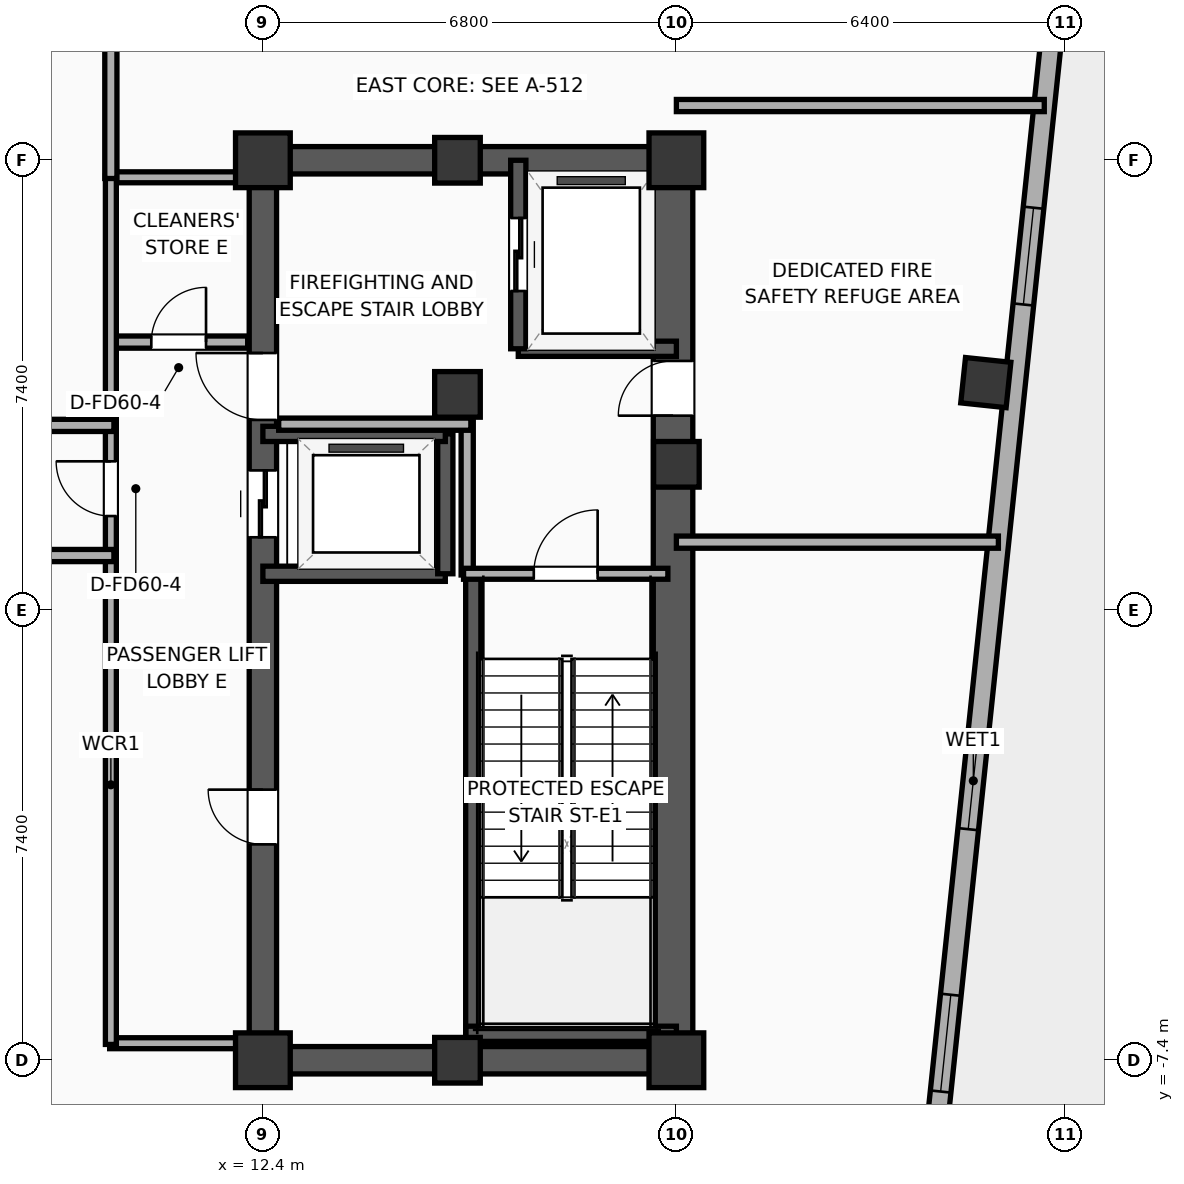
"""IFC4 building model, lengths in metres.
Left out: names, types, materials, properties, quantities, classifications, styles, units other than length and angle.
Written with IfcOpenShell. Run it as: python <this file> out.ifc"""

import sys

from ifc_helpers import new_model, si_unit, direction, frame, frame_2d, origin, origin_2d, place, context, subcontext, project, spatial, rectangle, hollow_rectangle, extrude, element, fill, save


model = new_model("IFC4")
c1 = context("Model", 3, precision=1e-05, world=origin(), true_north=direction((0.0, 1.0)))
c2 = subcontext(c1, "Body", "Model", "MODEL_VIEW")
j1 = project(units=[si_unit("LENGTHUNIT", "METRE"), si_unit("PLANEANGLEUNIT", "RADIAN")], contexts=[c1])
p1 = place(None, origin())
s1 = spatial("IfcSite", under=j1, at=p1, CompositionType="ELEMENT")
p2 = place(p1, origin())
s2 = spatial("IfcBuilding", under=s1, at=p2, CompositionType="ELEMENT")
p3 = place(p2, frame((0.0, 0.0, 254.8)))
s3 = spatial("IfcBuildingStorey", under=s2, at=p3, CompositionType="ELEMENT", Elevation=254.8)
p4 = place(p3, frame((12.4, -7.4, 0.0), z_axis=(0.0, 0.0, 1.0), x_axis=(1.0, 0.0, 0.0)))
e1 = element("IfcColumn", 1, at=p4, inside=s3, PredefinedType="COLUMN", context=c2, shape_type="SweptSolid", body=[
    extrude(rectangle(XDim=0.9, YDim=0.9, at=origin_2d()), origin(), (0.0, 0.0, 1.0), 5.2),
])
p5 = place(p3, frame((15.6, 3.55, 0.0), z_axis=(0.0, 0.0, 1.0), x_axis=(1.0, 0.0, 0.0)))
e2 = element("IfcColumn", 2, at=p5, inside=s3, PredefinedType="COLUMN", context=c2, shape_type="SweptSolid", body=[
    extrude(rectangle(XDim=0.75, YDim=0.75, at=origin_2d()), origin(), (0.0, 0.0, 1.0), 5.2),
])
p6 = place(p3, frame((12.4, 7.4, 0.0), z_axis=(0.0, 0.0, 1.0), x_axis=(1.0, 0.0, 0.0)))
e3 = element("IfcColumn", 3, at=p6, inside=s3, PredefinedType="COLUMN", context=c2, shape_type="SweptSolid", body=[
    extrude(rectangle(XDim=0.9, YDim=0.9, at=origin_2d()), origin(), (0.0, 0.0, 1.0), 5.2),
])
for number, where, z_axis, x_axis in (
    (4, (15.6, -7.4, 0.0), (0.0, 0.0, 1.0), (1.0, 0.0, 0.0)),
    (5, (15.6, 7.4, 0.0), (0.0, 0.0, 1.0), (1.0, 0.0, 0.0)),
):
    element("IfcColumn", number, at=place(p3, frame(where, z_axis=z_axis, x_axis=x_axis)), inside=s3, PredefinedType="COLUMN", context=c2, shape_type="SweptSolid", body=[
        extrude(rectangle(XDim=0.75, YDim=0.75, at=origin_2d()), origin(), (0.0, 0.0, 1.0), 5.2),
    ])
p7 = place(p3, frame((19.2, -7.4, 0.0), z_axis=(0.0, 0.0, 1.0), x_axis=(1.0, 0.0, 0.0)))
e6 = element("IfcColumn", 6, at=p7, inside=s3, PredefinedType="COLUMN", context=c2, shape_type="SweptSolid", body=[
    extrude(rectangle(XDim=0.9, YDim=0.9, at=origin_2d()), origin(), (0.0, 0.0, 1.0), 5.2),
])
p8 = place(p3, frame((19.2, 2.4, 0.0), z_axis=(0.0, 0.0, 1.0), x_axis=(1.0, 0.0, 0.0)))
e7 = element("IfcColumn", 7, at=p8, inside=s3, PredefinedType="COLUMN", context=c2, shape_type="SweptSolid", body=[
    extrude(rectangle(XDim=0.75, YDim=0.75, at=origin_2d()), origin(), (0.0, 0.0, 1.0), 5.2),
])
p9 = place(p3, frame((19.2, 7.4, 0.0), z_axis=(0.0, 0.0, 1.0), x_axis=(1.0, 0.0, 0.0)))
e8 = element("IfcColumn", 8, at=p9, inside=s3, PredefinedType="COLUMN", context=c2, shape_type="SweptSolid", body=[
    extrude(rectangle(XDim=0.9, YDim=0.9, at=origin_2d()), origin(), (0.0, 0.0, 1.0), 5.2),
])
for number, where, z_axis, x_axis in (
    (9, (12.175, -7.4, 0.0), (0.0, 0.0, 1.0), (1.0, 0.0, 0.0)),
    (10, (12.175, 7.4, 0.0), (0.0, 0.0, 1.0), (1.0, 0.0, 0.0)),
):
    element("IfcWall", number, at=place(p3, frame(where, z_axis=z_axis, x_axis=x_axis)), inside=s3, PredefinedType="SHEAR", context=c2, shape_type="SweptSolid", body=[
        extrude(rectangle(XDim=7.25, YDim=0.45, at=frame_2d((3.625, 0.0))), origin(), (0.0, 0.0, 1.0), 4.8),
    ])
p10 = place(p3, frame((12.4, -7.4, 0.0), z_axis=(0.0, 0.0, 1.0), x_axis=(0.0, 1.0, 0.0)))
e11 = element("IfcWall", 11, at=p10, inside=s3, PredefinedType="SHEAR", context=c2, shape_type="SweptSolid", body=[
    extrude(rectangle(XDim=14.8, YDim=0.45, at=frame_2d((7.4, 0.0))), origin(), (0.0, 0.0, 1.0), 4.8),
])
p11 = place(p10, frame((8.6, 0.0, 0.0)))
e12 = element("IfcOpeningElement", 12, at=p11, cuts=e11, PredefinedType="OPENING", context=c2, shape_type="SweptSolid", body=[
    extrude(rectangle(XDim=1.1, YDim=2.05, at=frame_2d((0.55, 1.025))), frame((0.0, 0.235, 0.0), z_axis=(0.0, -1.0, 0.0), x_axis=(1.0, 0.0, 0.0)), (0.0, 0.0, 1.0), 0.47),
])
p12 = place(p10, frame((10.53, 0.0, 0.0)))
e13 = element("IfcOpeningElement", 13, at=p12, cuts=e11, PredefinedType="OPENING", context=c2, shape_type="SweptSolid", body=[
    extrude(rectangle(XDim=1.1, YDim=2.05, at=frame_2d((0.55, 1.025))), frame((0.0, 0.235, 0.0), z_axis=(0.0, -1.0, 0.0), x_axis=(1.0, 0.0, 0.0)), (0.0, 0.0, 1.0), 0.47),
])
p13 = place(p10, frame((3.55, 0.0, 0.0)))
e14 = element("IfcOpeningElement", 14, at=p13, cuts=e11, PredefinedType="OPENING", context=c2, shape_type="SweptSolid", body=[
    extrude(rectangle(XDim=0.9, YDim=2.05, at=frame_2d((0.45, 1.025))), frame((0.0, 0.235, 0.0), z_axis=(0.0, -1.0, 0.0), x_axis=(1.0, 0.0, 0.0)), (0.0, 0.0, 1.0), 0.47),
])
p14 = place(p3, frame((19.145, -7.4, 0.0), z_axis=(0.0, 0.0, 1.0), x_axis=(0.0, 1.0, 0.0)))
e15 = element("IfcWall", 15, at=p14, inside=s3, PredefinedType="SHEAR", context=c2, shape_type="SweptSolid", body=[
    extrude(rectangle(XDim=14.8, YDim=0.65, at=frame_2d((7.4, 0.0))), origin(), (0.0, 0.0, 1.0), 4.8),
])
p15 = place(p14, frame((10.6, 0.0, 0.0)))
e16 = element("IfcOpeningElement", 16, at=p15, cuts=e15, PredefinedType="OPENING", context=c2, shape_type="SweptSolid", body=[
    extrude(rectangle(XDim=0.9, YDim=2.05, at=frame_2d((0.45, 1.025))), frame((0.0, 0.335, 0.0), z_axis=(0.0, -1.0, 0.0), x_axis=(1.0, 0.0, 0.0)), (0.0, 0.0, 1.0), 0.67),
])
p16 = place(p3, frame((15.86, -7.085, 0.0), z_axis=(0.0, 0.0, 1.0), x_axis=(0.0, 1.0, 0.0)))
e17 = element("IfcWall", 17, at=p16, inside=s3, PredefinedType="SOLIDWALL", context=c2, shape_type="SweptSolid", body=[
    extrude(rectangle(XDim=7.685, YDim=0.25, at=frame_2d((3.843, 0.0))), origin(), (0.0, 0.0, 1.0), 4.8),
])
p17 = place(p3, frame((15.74, -6.965, 0.0), z_axis=(0.0, 0.0, 1.0), x_axis=(1.0, 0.0, 0.0)))
e18 = element("IfcWall", 18, at=p17, inside=s3, PredefinedType="SOLIDWALL", context=c2, shape_type="SweptSolid", body=[
    extrude(rectangle(XDim=3.46, YDim=0.25, at=frame_2d((1.73, 0.0))), origin(), (0.0, 0.0, 1.0), 4.8),
])
p18 = place(p3, frame((24.289, 3.744, -0.4), z_axis=(0.0, 0.0, 1.0), x_axis=(0.994521895368, -0.104528463268, 0.0)))
e19 = element("IfcColumn", 19, at=p18, inside=s3, PredefinedType="COLUMN", context=c2, shape_type="SweptSolid", body=[
    extrude(hollow_rectangle(XDim=0.75, YDim=0.75, WallThickness=0.025, at=origin_2d()), origin(), (0.0, 0.0, 1.0), 5.6),
])
p19 = place(p3, frame((25.67, 12.296, 0.0), z_axis=(0.0, 0.0, 1.0), x_axis=(-0.104533282919, -0.994521388791, 0.0)))
e20 = element("IfcWall", 20, at=p19, inside=s3, PredefinedType="ELEMENTEDWALL", context=c2, shape_type="SweptSolid", body=[
    extrude(rectangle(XDim=30.366, YDim=0.34, at=frame_2d((15.183, 0.0))), origin(), (0.0, 0.0, 1.0), 3.69),
])
p20 = place(p19, frame((1.369, 0.0, 0.75)))
e21 = element("IfcOpeningElement", 21, at=p20, cuts=e20, PredefinedType="OPENING", context=c2, shape_type="SweptSolid", body=[
    extrude(rectangle(XDim=1.6, YDim=1.4, at=frame_2d((0.8, 0.7))), frame((0.0, 0.18, 0.0), z_axis=(0.0, -1.0, 0.0), x_axis=(1.0, 0.0, 0.0)), (0.0, 0.0, 1.0), 0.36),
])
p21 = place(p19, frame((5.707, 0.0, 0.75)))
e22 = element("IfcOpeningElement", 22, at=p21, cuts=e20, PredefinedType="OPENING", context=c2, shape_type="SweptSolid", body=[
    extrude(rectangle(XDim=1.6, YDim=1.4, at=frame_2d((0.8, 0.7))), frame((0.0, 0.18, 0.0), z_axis=(0.0, -1.0, 0.0), x_axis=(1.0, 0.0, 0.0)), (0.0, 0.0, 1.0), 0.36),
])
p22 = place(p19, frame((14.383, 0.0, 0.75)))
e23 = element("IfcOpeningElement", 23, at=p22, cuts=e20, PredefinedType="OPENING", context=c2, shape_type="SweptSolid", body=[
    extrude(rectangle(XDim=1.6, YDim=1.4, at=frame_2d((0.8, 0.7))), frame((0.0, 0.18, 0.0), z_axis=(0.0, -1.0, 0.0), x_axis=(1.0, 0.0, 0.0)), (0.0, 0.0, 1.0), 0.36),
])
p23 = place(p19, frame((18.721, 0.0, 0.75)))
e24 = element("IfcOpeningElement", 24, at=p23, cuts=e20, PredefinedType="OPENING", context=c2, shape_type="SweptSolid", body=[
    extrude(rectangle(XDim=1.6, YDim=1.4, at=frame_2d((0.8, 0.7))), frame((0.0, 0.18, 0.0), z_axis=(0.0, -1.0, 0.0), x_axis=(1.0, 0.0, 0.0)), (0.0, 0.0, 1.0), 0.36),
])
p24 = place(p19, frame((23.059, 0.0, 0.75)))
e25 = element("IfcOpeningElement", 25, at=p24, cuts=e20, PredefinedType="OPENING", context=c2, shape_type="SweptSolid", body=[
    extrude(rectangle(XDim=1.6, YDim=1.4, at=frame_2d((0.8, 0.7))), frame((0.0, 0.18, 0.0), z_axis=(0.0, -1.0, 0.0), x_axis=(1.0, 0.0, 0.0)), (0.0, 0.0, 1.0), 0.36),
])
p25 = place(p19, frame((27.397, 0.0, 0.75)))
e26 = element("IfcOpeningElement", 26, at=p25, cuts=e20, PredefinedType="OPENING", context=c2, shape_type="SweptSolid", body=[
    extrude(rectangle(XDim=1.6, YDim=1.4, at=frame_2d((0.8, 0.7))), frame((0.0, 0.18, 0.0), z_axis=(0.0, -1.0, 0.0), x_axis=(1.0, 0.0, 0.0)), (0.0, 0.0, 1.0), 0.36),
])
p26 = place(p3, frame((16.6, 4.3, 0.0), z_axis=(0.0, 0.0, 1.0), x_axis=(1.0, 0.0, 0.0)))
e27 = element("IfcWall", 27, at=p26, inside=s3, PredefinedType="SOLIDWALL", context=c2, shape_type="SweptSolid", body=[
    extrude(rectangle(XDim=2.6, YDim=0.25, at=frame_2d((1.3, 0.0))), origin(), (0.0, 0.0, 1.0), 4.8),
])
p27 = place(p3, frame((16.6, 7.4, 0.0), z_axis=(0.0, 0.0, 1.0), x_axis=(0.0, -1.0, 0.0)))
e28 = element("IfcWall", 28, at=p27, inside=s3, PredefinedType="SOLIDWALL", context=c2, shape_type="SweptSolid", body=[
    extrude(rectangle(XDim=3.1, YDim=0.25, at=frame_2d((1.55, 0.0))), origin(), (0.0, 0.0, 1.0), 4.8),
])
p28 = place(p27, frame((0.95, 0.0, 0.0)))
e29 = element("IfcOpeningElement", 29, at=p28, cuts=e28, PredefinedType="OPENING", context=c2, shape_type="SweptSolid", body=[
    extrude(rectangle(XDim=1.2, YDim=2.05, at=frame_2d((0.6, 1.025))), frame((0.0, 0.135, 0.0), z_axis=(0.0, -1.0, 0.0), x_axis=(1.0, 0.0, 0.0)), (0.0, 0.0, 1.0), 0.27),
])
p29 = place(p3, frame((12.4, 0.6, 0.0), z_axis=(0.0, 0.0, 1.0), x_axis=(1.0, 0.0, 0.0)))
e30 = element("IfcWall", 30, at=p29, inside=s3, PredefinedType="SOLIDWALL", context=c2, shape_type="SweptSolid", body=[
    extrude(rectangle(XDim=3.0, YDim=0.25, at=frame_2d((1.5, 0.0))), origin(), (0.0, 0.0, 1.0), 4.8),
])
p30 = place(p3, frame((15.4, 0.6, 0.0), z_axis=(0.0, 0.0, 1.0), x_axis=(0.0, 1.0, 0.0)))
e31 = element("IfcWall", 31, at=p30, inside=s3, PredefinedType="SOLIDWALL", context=c2, shape_type="SweptSolid", body=[
    extrude(rectangle(XDim=2.3, YDim=0.25, at=frame_2d((1.15, 0.0))), origin(), (0.0, 0.0, 1.0), 4.8),
])
p31 = place(p3, frame((15.4, 2.9, 0.0), z_axis=(0.0, 0.0, 1.0), x_axis=(-1.0, 0.0, 0.0)))
e32 = element("IfcWall", 32, at=p31, inside=s3, PredefinedType="SOLIDWALL", context=c2, shape_type="SweptSolid", body=[
    extrude(rectangle(XDim=3.0, YDim=0.25, at=frame_2d((1.5, 0.0))), origin(), (0.0, 0.0, 1.0), 4.8),
])
p32 = place(p3, frame((15.76, 0.58, 0.0), z_axis=(0.0, 0.0, 1.0), x_axis=(0.0, 1.0, 0.0)))
e33 = element("IfcWall", 33, at=p32, inside=s3, PredefinedType="PARTITIONING", context=c2, shape_type="SweptSolid", body=[
    extrude(rectangle(XDim=2.52, YDim=0.2, at=frame_2d((1.26, 0.0))), origin(), (0.0, 0.0, 1.0), 4.8),
])
p33 = place(p3, frame((12.66, 3.06, 0.0), z_axis=(0.0, 0.0, 1.0), x_axis=(1.0, 0.0, 0.0)))
e34 = element("IfcWall", 34, at=p33, inside=s3, PredefinedType="PARTITIONING", context=c2, shape_type="SweptSolid", body=[
    extrude(rectangle(XDim=3.16, YDim=0.2, at=frame_2d((1.58, 0.0))), origin(), (0.0, 0.0, 1.0), 4.8),
])
p34 = place(p3, frame((15.7, 0.6, 0.0), z_axis=(0.0, 0.0, 1.0), x_axis=(1.0, 0.0, 0.0)))
e35 = element("IfcWall", 35, at=p34, inside=s3, PredefinedType="PARTITIONING", context=c2, shape_type="SweptSolid", body=[
    extrude(rectangle(XDim=3.36, YDim=0.18, at=frame_2d((1.68, 0.0))), origin(), (0.0, 0.0, 1.0), 4.8),
])
p35 = place(p34, frame((1.155, 0.0, 0.0)))
e36 = element("IfcOpeningElement", 36, at=p35, cuts=e35, PredefinedType="OPENING", context=c2, shape_type="SweptSolid", body=[
    extrude(rectangle(XDim=1.05, YDim=2.05, at=frame_2d((0.525, 1.025))), frame((0.0, 0.1, 0.0), z_axis=(0.0, -1.0, 0.0), x_axis=(1.0, 0.0, 0.0)), (0.0, 0.0, 1.0), 0.2),
])
p36 = place(p3, frame((9.88, 4.41, 0.0), z_axis=(0.0, 0.0, 1.0), x_axis=(1.0, 0.0, 0.0)))
e37 = element("IfcWall", 37, at=p36, inside=s3, PredefinedType="PARTITIONING", context=c2, shape_type="SweptSolid", body=[
    extrude(rectangle(XDim=2.27, YDim=0.2, at=frame_2d((1.135, 0.0))), origin(), (0.0, 0.0, 1.0), 4.8),
])
p37 = place(p36, frame((0.685, 0.0, 0.0)))
e38 = element("IfcOpeningElement", 38, at=p37, cuts=e37, PredefinedType="OPENING", context=c2, shape_type="SweptSolid", body=[
    extrude(rectangle(XDim=0.9, YDim=2.05, at=frame_2d((0.45, 1.025))), frame((0.0, 0.11, 0.0), z_axis=(0.0, -1.0, 0.0), x_axis=(1.0, 0.0, 0.0)), (0.0, 0.0, 1.0), 0.22),
])
for number, where, z_axis, x_axis in (
    (39, (9.88, 7.12, 0.0), (0.0, 0.0, 1.0), (1.0, 0.0, 0.0)),
    (40, (9.88, -7.12, 0.0), (0.0, 0.0, 1.0), (1.0, 0.0, 0.0)),
):
    element("IfcWall", number, at=place(p3, frame(where, z_axis=z_axis, x_axis=x_axis)), inside=s3, PredefinedType="PARTITIONING", context=c2, shape_type="SweptSolid", body=[
        extrude(rectangle(XDim=2.27, YDim=0.18, at=frame_2d((1.135, 0.0))), origin(), (0.0, 0.0, 1.0), 3.84),
    ])
p38 = place(p3, frame((9.9, -7.14, 0.0), z_axis=(0.0, 0.0, 1.0), x_axis=(0.0, 1.0, 0.0)))
e41 = element("IfcWall", 41, at=p38, inside=s3, PredefinedType="PARTITIONING", context=c2, shape_type="SweptSolid", body=[
    extrude(rectangle(XDim=14.28, YDim=0.18, at=frame_2d((7.14, 0.0))), origin(), (0.0, 0.0, 1.0), 4.8),
])
p39 = place(p38, frame((8.689, 0.0, 0.0)))
e42 = element("IfcOpeningElement", 42, at=p39, cuts=e41, PredefinedType="OPENING", context=c2, shape_type="SweptSolid", body=[
    extrude(rectangle(XDim=0.9, YDim=2.05, at=frame_2d((0.45, 1.025))), frame((0.0, 0.1, 0.0), z_axis=(0.0, -1.0, 0.0), x_axis=(1.0, 0.0, 0.0)), (0.0, 0.0, 1.0), 0.2),
])
p40 = place(p3, frame((-9.95, 3.04, 0.0), z_axis=(0.0, 0.0, 1.0), x_axis=(1.0, 0.0, 0.0)))
e43 = element("IfcWall", 43, at=p40, inside=s3, PredefinedType="PARTITIONING", context=c2, shape_type="SweptSolid", body=[
    extrude(rectangle(XDim=19.9, YDim=0.2, at=frame_2d((9.95, 0.0))), origin(), (0.0, 0.0, 1.0), 4.8),
])
p41 = place(p40, frame((9.425, 0.0, 0.0)))
e44 = element("IfcOpeningElement", 44, at=p41, cuts=e43, PredefinedType="OPENING", context=c2, shape_type="SweptSolid", body=[
    extrude(rectangle(XDim=1.05, YDim=2.05, at=frame_2d((0.525, 1.025))), frame((0.0, 0.11, 0.0), z_axis=(0.0, -1.0, 0.0), x_axis=(1.0, 0.0, 0.0)), (0.0, 0.0, 1.0), 0.22),
])
p42 = place(p3, frame((-9.95, 0.9, 0.0), z_axis=(0.0, 0.0, 1.0), x_axis=(1.0, 0.0, 0.0)))
e45 = element("IfcWall", 45, at=p42, inside=s3, PredefinedType="PARTITIONING", context=c2, shape_type="SweptSolid", body=[
    extrude(rectangle(XDim=19.9, YDim=0.2, at=frame_2d((9.95, 0.0))), origin(), (0.0, 0.0, 1.0), 4.8),
])
p43 = place(p42, frame((9.425, 0.0, 0.0)))
e46 = element("IfcOpeningElement", 46, at=p43, cuts=e45, PredefinedType="OPENING", context=c2, shape_type="SweptSolid", body=[
    extrude(rectangle(XDim=1.05, YDim=2.05, at=frame_2d((0.525, 1.025))), frame((0.0, 0.11, 0.0), z_axis=(0.0, -1.0, 0.0), x_axis=(1.0, 0.0, 0.0)), (0.0, 0.0, 1.0), 0.22),
])
p44 = place(p3, frame((19.2, 1.12, 0.0), z_axis=(0.0, 0.0, 1.0), x_axis=(1.0, 0.0, 0.0)))
e47 = element("IfcWall", 47, at=p44, inside=s3, PredefinedType="PARTITIONING", context=c2, shape_type="SweptSolid", body=[
    extrude(rectangle(XDim=5.296, YDim=0.2, at=frame_2d((2.648, 0.0))), origin(), (0.0, 0.0, 1.0), 4.8),
])
p45 = place(p3, frame((19.2, 8.3, 0.0), z_axis=(0.0, 0.0, 1.0), x_axis=(1.0, 0.0, 0.0)))
e48 = element("IfcWall", 48, at=p45, inside=s3, PredefinedType="PARTITIONING", context=c2, shape_type="SweptSolid", body=[
    extrude(rectangle(XDim=6.05, YDim=0.2, at=frame_2d((3.025, 0.0))), origin(), (0.0, 0.0, 1.0), 4.8),
])
p46 = place(p3, frame((9.9, 7.1, 0.0), z_axis=(0.0, 0.0, 1.0), x_axis=(0.0, 1.0, 0.0)))
e49 = element("IfcWall", 49, at=p46, inside=s3, PredefinedType="PARTITIONING", context=c2, shape_type="SweptSolid", body=[
    extrude(rectangle(XDim=10.319, YDim=0.2, at=frame_2d((5.159, 0.0))), origin(), (0.0, 0.0, 1.0), 4.8),
])
p47 = place(p46, frame((5.46, 0.0, 0.0)))
e50 = element("IfcOpeningElement", 50, at=p47, cuts=e49, PredefinedType="OPENING", context=c2, shape_type="SweptSolid", body=[
    extrude(rectangle(XDim=1.05, YDim=2.05, at=frame_2d((0.525, 1.025))), frame((0.0, 0.11, 0.0), z_axis=(0.0, -1.0, 0.0), x_axis=(1.0, 0.0, 0.0)), (0.0, 0.0, 1.0), 0.22),
])
p48 = place(p21, origin())
e51 = element("IfcWindow", 51, at=p48, inside=s3, PartitioningType="SINGLE_PANEL", PredefinedType="WINDOW", context=c2, shape_type="SweptSolid", body=[
    extrude(rectangle(XDim=1.6, YDim=1.4, at=frame_2d((0.8, 0.7))), frame((0.0, 0.03, 0.0), z_axis=(0.0, -1.0, 0.0), x_axis=(1.0, 0.0, 0.0)), (0.0, 0.0, 1.0), 0.06),
])
fill(e22, e51)
p49 = place(p22, origin())
e52 = element("IfcWindow", 52, at=p49, inside=s3, PartitioningType="SINGLE_PANEL", PredefinedType="WINDOW", context=c2, shape_type="SweptSolid", body=[
    extrude(rectangle(XDim=1.6, YDim=1.4, at=frame_2d((0.8, 0.7))), frame((0.0, 0.03, 0.0), z_axis=(0.0, -1.0, 0.0), x_axis=(1.0, 0.0, 0.0)), (0.0, 0.0, 1.0), 0.06),
])
fill(e23, e52)
p50 = place(p23, origin())
e53 = element("IfcWindow", 53, at=p50, inside=s3, PartitioningType="SINGLE_PANEL", PredefinedType="WINDOW", context=c2, shape_type="SweptSolid", body=[
    extrude(rectangle(XDim=1.6, YDim=1.4, at=frame_2d((0.8, 0.7))), frame((0.0, 0.03, 0.0), z_axis=(0.0, -1.0, 0.0), x_axis=(1.0, 0.0, 0.0)), (0.0, 0.0, 1.0), 0.06),
])
fill(e24, e53)
p51 = place(p28, origin())
e54 = element("IfcDoor", 54, at=p51, inside=s3, OperationType="SLIDING_TO_LEFT", PredefinedType="DOOR", context=c2, shape_type="SweptSolid", body=[
    extrude(rectangle(XDim=1.2, YDim=2.05, at=frame_2d((0.6, 1.025))), frame((0.0, 0.025, 0.0), z_axis=(0.0, -1.0, 0.0), x_axis=(1.0, 0.0, 0.0)), (0.0, 0.0, 1.0), 0.05),
])
fill(e29, e54)
p52 = place(p11, origin())
e55 = element("IfcDoor", 55, at=p52, inside=s3, OperationType="SLIDING_TO_LEFT", PredefinedType="DOOR", context=c2, shape_type="SweptSolid", body=[
    extrude(rectangle(XDim=1.1, YDim=2.05, at=frame_2d((0.55, 1.025))), frame((0.0, 0.025, 0.0), z_axis=(0.0, -1.0, 0.0), x_axis=(1.0, 0.0, 0.0)), (0.0, 0.0, 1.0), 0.05),
])
fill(e12, e55)
p53 = place(p35, origin())
e56 = element("IfcDoor", 56, at=p53, inside=s3, OperationType="SINGLE_SWING_RIGHT", PredefinedType="DOOR", context=c2, shape_type="SweptSolid", body=[
    extrude(rectangle(XDim=1.05, YDim=2.05, at=frame_2d((0.525, 1.025))), frame((0.0, 0.025, 0.0), z_axis=(0.0, -1.0, 0.0), x_axis=(1.0, 0.0, 0.0)), (0.0, 0.0, 1.0), 0.05),
])
fill(e36, e56)
p54 = place(p37, origin())
e57 = element("IfcDoor", 57, at=p54, inside=s3, OperationType="SINGLE_SWING_RIGHT", PredefinedType="DOOR", context=c2, shape_type="SweptSolid", body=[
    extrude(rectangle(XDim=0.9, YDim=2.05, at=frame_2d((0.45, 1.025))), frame((0.0, 0.025, 0.0), z_axis=(0.0, -1.0, 0.0), x_axis=(1.0, 0.0, 0.0)), (0.0, 0.0, 1.0), 0.05),
])
fill(e38, e57)
p55 = place(p39, origin())
e58 = element("IfcDoor", 58, at=p55, inside=s3, OperationType="SINGLE_SWING_RIGHT", PredefinedType="DOOR", context=c2, shape_type="SweptSolid", body=[
    extrude(rectangle(XDim=0.9, YDim=2.05, at=frame_2d((0.45, 1.025))), frame((0.0, 0.025, 0.0), z_axis=(0.0, -1.0, 0.0), x_axis=(1.0, 0.0, 0.0)), (0.0, 0.0, 1.0), 0.05),
])
fill(e42, e58)
p56 = place(p12, origin())
e59 = element("IfcDoor", 59, at=p56, inside=s3, OperationType="SINGLE_SWING_RIGHT", PredefinedType="DOOR", context=c2, shape_type="SweptSolid", body=[
    extrude(rectangle(XDim=1.1, YDim=2.05, at=frame_2d((0.55, 1.025))), frame((0.0, 0.025, 0.0), z_axis=(0.0, -1.0, 0.0), x_axis=(1.0, 0.0, 0.0)), (0.0, 0.0, 1.0), 0.05),
])
fill(e13, e59)
p57 = place(p15, origin())
e60 = element("IfcDoor", 60, at=p57, inside=s3, OperationType="SINGLE_SWING_LEFT", PredefinedType="DOOR", context=c2, shape_type="SweptSolid", body=[
    extrude(rectangle(XDim=0.9, YDim=2.05, at=frame_2d((0.45, 1.025))), frame((0.0, 0.025, 0.0), z_axis=(0.0, -1.0, 0.0), x_axis=(1.0, 0.0, 0.0)), (0.0, 0.0, 1.0), 0.05),
])
fill(e16, e60)
p58 = place(p13, origin())
e61 = element("IfcDoor", 61, at=p58, inside=s3, OperationType="SINGLE_SWING_RIGHT", PredefinedType="DOOR", context=c2, shape_type="SweptSolid", body=[
    extrude(rectangle(XDim=0.9, YDim=2.05, at=frame_2d((0.45, 1.025))), frame((0.0, 0.025, 0.0), z_axis=(0.0, -1.0, 0.0), x_axis=(1.0, 0.0, 0.0)), (0.0, 0.0, 1.0), 0.05),
])
fill(e14, e61)
save(model, sys.argv[1])
